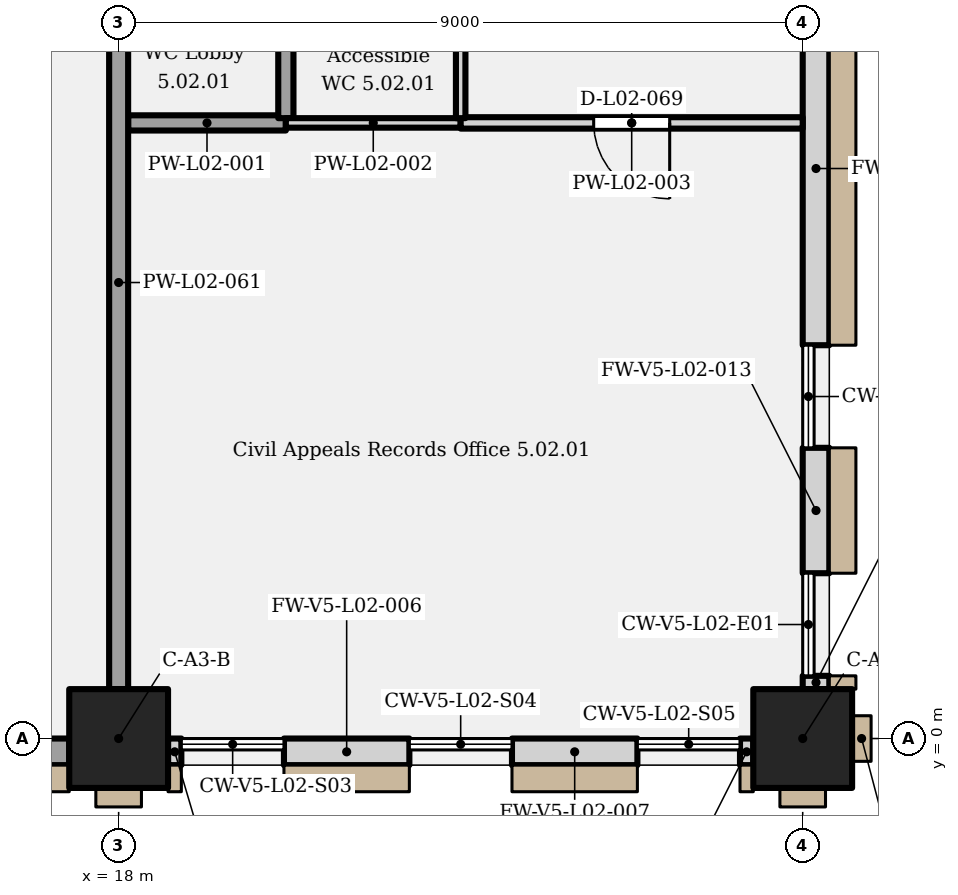
"""IFC4 building model, lengths in metres.
Left out: names, types, materials, properties, quantities, classifications, styles, units other than length and angle.
Written with IfcOpenShell. Run it as: python <this file> out.ifc"""

import sys

from ifc_helpers import new_model, si_unit, direction, frame, frame_2d, origin, origin_2d, place, context, subcontext, project, spatial, rectangle, extrude, element, fill, save


model = new_model("IFC4")
c1 = context("Model", 3, precision=1e-05, world=origin(), true_north=direction((0.0, 1.0)))
c2 = subcontext(c1, "Body", "Model", "MODEL_VIEW")
j1 = project(units=[si_unit("LENGTHUNIT", "METRE"), si_unit("PLANEANGLEUNIT", "RADIAN")], contexts=[c1])
p1 = place(None, origin())
s1 = spatial("IfcSite", under=j1, at=p1, CompositionType="ELEMENT")
p2 = place(p1, origin())
s2 = spatial("IfcBuilding", under=s1, at=p2, CompositionType="ELEMENT")
p3 = place(p2, frame((0.0, 0.0, 12.0)))
s3 = spatial("IfcBuildingStorey", under=s2, at=p3, CompositionType="ELEMENT", Elevation=12.0)
for number, where, z_axis, x_axis in (
    (1, (18.0, 0.0, 0.0), (0.0, 0.0, 1.0), (1.0, 0.0, 0.0)),
    (2, (27.0, 0.0, 0.0), (0.0, 0.0, 1.0), (1.0, 0.0, 0.0)),
):
    element("IfcColumn", number, at=place(p3, frame(where, z_axis=z_axis, x_axis=x_axis)), inside=s3, PredefinedType="COLUMN", context=c2, shape_type="SweptSolid", body=[
        extrude(rectangle(XDim=1.3, YDim=1.3, at=origin_2d()), origin(), (0.0, 0.0, 1.0), 5.4),
    ])
p4 = place(p3, frame((9.65, -0.175, 0.0), z_axis=(0.0, 0.0, 1.0), x_axis=(1.0, 0.0, 0.0)))
e3 = element("IfcWall", 3, at=p4, inside=s3, PredefinedType="SOLIDWALL", context=c2, shape_type="SweptSolid", body=[
    extrude(rectangle(XDim=7.7, YDim=0.35, at=frame_2d((3.85, 0.0))), origin(), (0.0, 0.0, 1.0), 5.15),
])
p5 = place(p3, frame((18.65, -0.175, 0.0), z_axis=(0.0, 0.0, 1.0), x_axis=(1.0, 0.0, 0.0)))
e4 = element("IfcWall", 4, at=p5, inside=s3, PredefinedType="SOLIDWALL", context=c2, shape_type="SweptSolid", body=[
    extrude(rectangle(XDim=0.175, YDim=0.35, at=frame_2d((0.087, 0.0))), origin(), (0.0, 0.0, 1.0), 5.15),
])
for number, where, z_axis, x_axis in (
    (5, (20.175, -0.175, 0.0), (0.0, 0.0, 1.0), (1.0, 0.0, 0.0)),
    (6, (23.175, -0.175, 0.0), (0.0, 0.0, 1.0), (1.0, 0.0, 0.0)),
):
    element("IfcWall", number, at=place(p3, frame(where, z_axis=z_axis, x_axis=x_axis)), inside=s3, PredefinedType="SOLIDWALL", context=c2, shape_type="SweptSolid", body=[
        extrude(rectangle(XDim=1.65, YDim=0.35, at=frame_2d((0.825, 0.0))), origin(), (0.0, 0.0, 1.0), 5.15),
    ])
for number, where, z_axis, x_axis in (
    (7, (26.175, -0.175, 0.0), (0.0, 0.0, 1.0), (1.0, 0.0, 0.0)),
    (8, (27.175, 0.65, 0.0), (0.0, 0.0, 1.0), (0.0, 1.0, 0.0)),
):
    element("IfcWall", number, at=place(p3, frame(where, z_axis=z_axis, x_axis=x_axis)), inside=s3, PredefinedType="SOLIDWALL", context=c2, shape_type="SweptSolid", body=[
        extrude(rectangle(XDim=0.175, YDim=0.35, at=frame_2d((0.087, 0.0))), origin(), (0.0, 0.0, 1.0), 5.15),
    ])
p6 = place(p3, frame((27.175, 2.175, 0.0), z_axis=(0.0, 0.0, 1.0), x_axis=(0.0, 1.0, 0.0)))
e9 = element("IfcWall", 9, at=p6, inside=s3, PredefinedType="SOLIDWALL", context=c2, shape_type="SweptSolid", body=[
    extrude(rectangle(XDim=1.65, YDim=0.35, at=frame_2d((0.825, 0.0))), origin(), (0.0, 0.0, 1.0), 5.15),
])
p7 = place(p3, frame((27.175, 5.175, 0.0), z_axis=(0.0, 0.0, 1.0), x_axis=(0.0, 1.0, 0.0)))
e10 = element("IfcWall", 10, at=p7, inside=s3, PredefinedType="SOLIDWALL", context=c2, shape_type="SweptSolid", body=[
    extrude(rectangle(XDim=4.65, YDim=0.35, at=frame_2d((2.325, 0.0))), origin(), (0.0, 0.0, 1.0), 5.15),
])
p8 = place(p3, frame((18.125, 8.1, 0.0), z_axis=(0.0, 0.0, 1.0), x_axis=(1.0, 0.0, 0.0)))
e11 = element("IfcWall", 11, at=p8, inside=s3, PredefinedType="PARTITIONING", context=c2, shape_type="SweptSolid", body=[
    extrude(rectangle(XDim=2.075, YDim=0.2, at=frame_2d((1.038, 0.0))), origin(), (0.0, 0.0, 1.0), 5.15),
])
p9 = place(p3, frame((20.2, 8.1, 0.0), z_axis=(0.0, 0.0, 1.0), x_axis=(1.0, 0.0, 0.0)))
e12 = element("IfcWall", 12, at=p9, inside=s3, PredefinedType="PARTITIONING", context=c2, shape_type="SweptSolid", body=[
    extrude(rectangle(XDim=2.3, YDim=0.125, at=frame_2d((1.15, 0.0))), origin(), (0.0, 0.0, 1.0), 5.15),
])
p10 = place(p3, frame((22.5, 8.1, 0.0), z_axis=(0.0, 0.0, 1.0), x_axis=(1.0, 0.0, 0.0)))
e13 = element("IfcWall", 13, at=p10, inside=s3, PredefinedType="PARTITIONING", context=c2, shape_type="SweptSolid", body=[
    extrude(rectangle(XDim=4.5, YDim=0.15, at=frame_2d((2.25, 0.0))), origin(), (0.0, 0.0, 1.0), 5.15),
])
p11 = place(p10, frame((2.75, 0.0, 0.0), z_axis=(0.0, 0.0, 1.0), x_axis=(-1.0, 0.0, 0.0)))
e14 = element("IfcOpeningElement", 14, at=p11, cuts=e13, PredefinedType="OPENING", context=c2, shape_type="SweptSolid", body=[
    extrude(rectangle(XDim=1.0, YDim=2.1, at=frame_2d((0.5, 1.05))), frame((0.0, 0.085, 0.0), z_axis=(0.0, -1.0, 0.0), x_axis=(1.0, 0.0, 0.0)), (0.0, 0.0, 1.0), 0.17),
])
p12 = place(p3, frame((18.0, 0.65, 0.0), z_axis=(0.0, 0.0, 1.0), x_axis=(0.0, 1.0, 0.0)))
e15 = element("IfcWall", 15, at=p12, inside=s3, PredefinedType="PARTITIONING", context=c2, shape_type="SweptSolid", body=[
    extrude(rectangle(XDim=10.7, YDim=0.25, at=frame_2d((5.35, 0.0))), origin(), (0.0, 0.0, 1.0), 4.4),
])
p13 = place(p3, frame((20.2, 8.163, 0.0), z_axis=(0.0, 0.0, 1.0), x_axis=(0.0, 1.0, 0.0)))
e16 = element("IfcWall", 16, at=p13, inside=s3, PredefinedType="PARTITIONING", context=c2, shape_type="SweptSolid", body=[
    extrude(rectangle(XDim=8.837, YDim=0.2, at=frame_2d((4.419, 0.0))), origin(), (0.0, 0.0, 1.0), 5.15),
])
p14 = place(p13, frame((8.037, 0.0, 0.0), z_axis=(0.0, 0.0, 1.0), x_axis=(-1.0, 0.0, 0.0)))
e17 = element("IfcOpeningElement", 17, at=p14, cuts=e16, PredefinedType="OPENING", context=c2, shape_type="SweptSolid", body=[
    extrude(rectangle(XDim=0.9, YDim=2.1, at=frame_2d((0.45, 1.05))), frame((0.0, 0.11, 0.0), z_axis=(0.0, -1.0, 0.0), x_axis=(1.0, 0.0, 0.0)), (0.0, 0.0, 1.0), 0.22),
])
p15 = place(p13, frame((5.337, 0.0, 0.0), z_axis=(0.0, 0.0, 1.0), x_axis=(-1.0, 0.0, 0.0)))
e18 = element("IfcOpeningElement", 18, at=p15, cuts=e16, PredefinedType="OPENING", context=c2, shape_type="SweptSolid", body=[
    extrude(rectangle(XDim=0.9, YDim=2.1, at=frame_2d((0.45, 1.05))), frame((0.0, 0.11, 0.0), z_axis=(0.0, -1.0, 0.0), x_axis=(1.0, 0.0, 0.0)), (0.0, 0.0, 1.0), 0.22),
])
p16 = place(p13, frame((2.238, 0.0, 0.0), z_axis=(0.0, 0.0, 1.0), x_axis=(-1.0, 0.0, 0.0)))
e19 = element("IfcOpeningElement", 19, at=p16, cuts=e16, PredefinedType="OPENING", context=c2, shape_type="SweptSolid", body=[
    extrude(rectangle(XDim=1.0, YDim=2.1, at=frame_2d((0.5, 1.05))), frame((0.0, 0.11, 0.0), z_axis=(0.0, -1.0, 0.0), x_axis=(1.0, 0.0, 0.0)), (0.0, 0.0, 1.0), 0.22),
])
p17 = place(p3, frame((22.5, 8.163, 0.0), z_axis=(0.0, 0.0, 1.0), x_axis=(0.0, 1.0, 0.0)))
e20 = element("IfcWall", 20, at=p17, inside=s3, PredefinedType="PARTITIONING", context=c2, shape_type="SweptSolid", body=[
    extrude(rectangle(XDim=8.837, YDim=0.125, at=frame_2d((4.419, 0.0))), origin(), (0.0, 0.0, 1.0), 5.15),
])
p18 = place(p11, origin())
e21 = element("IfcDoor", 21, at=p18, inside=s3, OperationType="SINGLE_SWING_LEFT", PredefinedType="DOOR", context=c2, shape_type="SweptSolid", body=[
    extrude(rectangle(XDim=1.0, YDim=2.1, at=frame_2d((0.5, 1.05))), frame((0.0, 0.025, 0.0), z_axis=(0.0, -1.0, 0.0), x_axis=(1.0, 0.0, 0.0)), (0.0, 0.0, 1.0), 0.05),
])
fill(e14, e21)
save(model, sys.argv[1])
